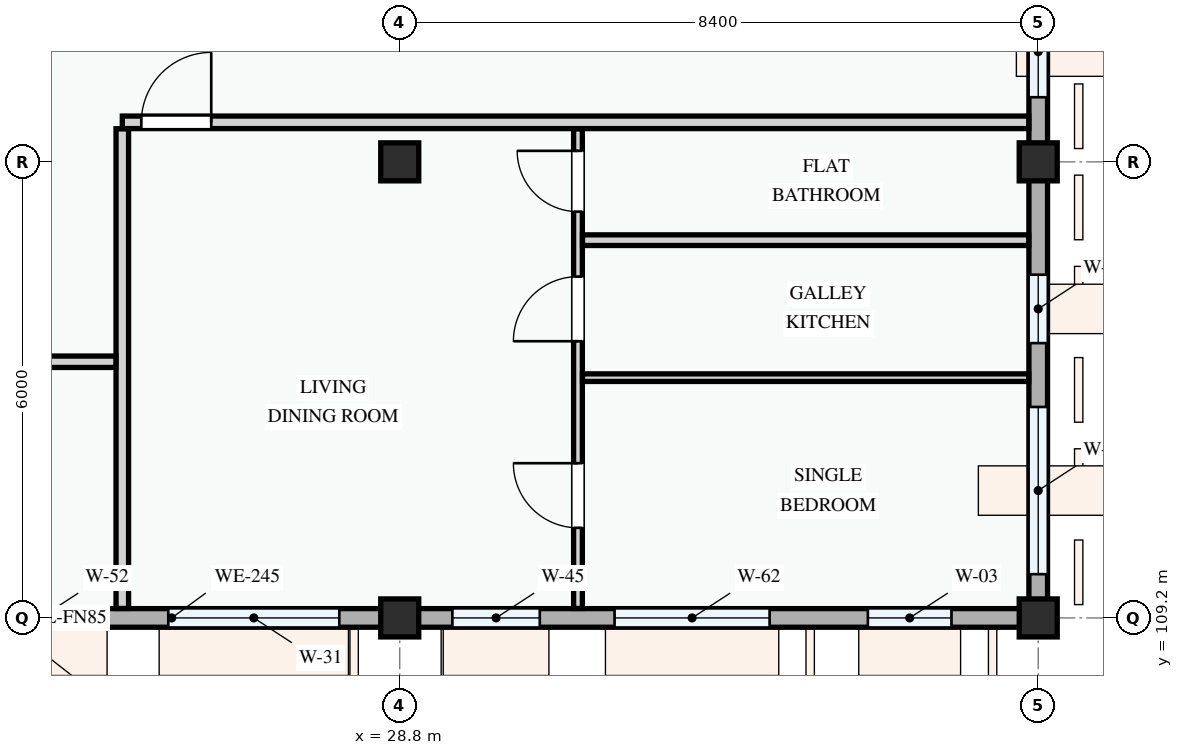
"""IFC4 building model, lengths in metres.
Left out: names, types, materials, properties, quantities, classifications, styles, units other than length and angle.
Written with IfcOpenShell. Run it as: python <this file> out.ifc"""

import sys

from ifc_helpers import new_model, si_unit, direction, frame, frame_2d, origin, origin_2d, place, context, subcontext, project, spatial, rectangle, extrude, element, fill, save


model = new_model("IFC4")
c1 = context("Model", 3, precision=1e-05, world=origin(), true_north=direction((0.0, 1.0)))
c2 = subcontext(c1, "Body", "Model", "MODEL_VIEW")
j1 = project(units=[si_unit("LENGTHUNIT", "METRE"), si_unit("PLANEANGLEUNIT", "RADIAN")], contexts=[c1])
p1 = place(None, origin())
s1 = spatial("IfcSite", under=j1, at=p1, CompositionType="ELEMENT")
p2 = place(p1, origin())
s2 = spatial("IfcBuilding", under=s1, at=p2, CompositionType="ELEMENT")
p3 = place(p2, frame((0.0, 0.0, 41.1)))
s3 = spatial("IfcBuildingStorey", under=s2, at=p3, CompositionType="ELEMENT", Elevation=41.1)
for number, where, z_axis, x_axis in (
    (1, (28.8, 109.2, 0.0), (0.0, 0.0, 1.0), (1.0, 0.0, 0.0)),
    (2, (28.8, 115.2, 0.0), (0.0, 0.0, 1.0), (1.0, 0.0, 0.0)),
    (3, (37.2, 109.2, 0.0), (0.0, 0.0, 1.0), (1.0, 0.0, 0.0)),
    (4, (37.2, 115.2, 0.0), (0.0, 0.0, 1.0), (1.0, 0.0, 0.0)),
):
    element("IfcColumn", number, at=place(p3, frame(where, z_axis=z_axis, x_axis=x_axis)), inside=s3, PredefinedType="COLUMN", context=c2, shape_type="SweptSolid", body=[
        extrude(rectangle(XDim=0.5, YDim=0.5, at=origin_2d()), origin(), (0.0, 0.0, 1.0), 3.3),
    ])
p4 = place(p3, frame((22.8, 109.2, 0.0), z_axis=(0.0, 0.0, 1.0), x_axis=(1.0, 0.0, 0.0)))
e5 = element("IfcWall", 5, at=p4, inside=s3, PredefinedType="STANDARD", context=c2, shape_type="SweptSolid", body=[
    extrude(rectangle(XDim=6.0, YDim=0.245, at=frame_2d((3.0, 0.0))), origin(), (0.0, 0.0, 1.0), 2.525),
])
p5 = place(p4, frame((0.51, 0.0, 0.78)))
e6 = element("IfcOpeningElement", 6, at=p5, cuts=e5, PredefinedType="OPENING", context=c2, shape_type="SweptSolid", body=[
    extrude(rectangle(XDim=1.52, YDim=1.42, at=frame_2d((0.76, 0.71))), frame((0.0, 0.133, 0.0), z_axis=(0.0, -1.0, 0.0), x_axis=(1.0, 0.0, 0.0)), (0.0, 0.0, 1.0), 0.265),
])
p6 = place(p4, frame((2.955, 0.0, 0.78)))
e7 = element("IfcOpeningElement", 7, at=p6, cuts=e5, PredefinedType="OPENING", context=c2, shape_type="SweptSolid", body=[
    extrude(rectangle(XDim=2.25, YDim=1.6, at=frame_2d((1.125, 0.8))), frame((0.0, 0.133, 0.0), z_axis=(0.0, -1.0, 0.0), x_axis=(1.0, 0.0, 0.0)), (0.0, 0.0, 1.0), 0.265),
])
p7 = place(p3, frame((28.8, 109.2, 0.0), z_axis=(0.0, 0.0, 1.0), x_axis=(1.0, 0.0, 0.0)))
e8 = element("IfcWall", 8, at=p7, inside=s3, PredefinedType="STANDARD", context=c2, shape_type="SweptSolid", body=[
    extrude(rectangle(XDim=8.4, YDim=0.245, at=frame_2d((4.2, 0.0))), origin(), (0.0, 0.0, 1.0), 2.375),
])
p8 = place(p7, frame((0.692, 0.0, 0.78)))
e9 = element("IfcOpeningElement", 9, at=p8, cuts=e8, PredefinedType="OPENING", context=c2, shape_type="SweptSolid", body=[
    extrude(rectangle(XDim=1.15, YDim=1.25, at=frame_2d((0.575, 0.625))), frame((0.0, 0.133, 0.0), z_axis=(0.0, -1.0, 0.0), x_axis=(1.0, 0.0, 0.0)), (0.0, 0.0, 1.0), 0.265),
])
p9 = place(p7, frame((2.826, 0.0, 0.78)))
e10 = element("IfcOpeningElement", 10, at=p9, cuts=e8, PredefinedType="OPENING", context=c2, shape_type="SweptSolid", body=[
    extrude(rectangle(XDim=2.04, YDim=1.46, at=frame_2d((1.02, 0.73))), frame((0.0, 0.133, 0.0), z_axis=(0.0, -1.0, 0.0), x_axis=(1.0, 0.0, 0.0)), (0.0, 0.0, 1.0), 0.265),
])
p10 = place(p7, frame((6.159, 0.0, 0.78)))
e11 = element("IfcOpeningElement", 11, at=p10, cuts=e8, PredefinedType="OPENING", context=c2, shape_type="SweptSolid", body=[
    extrude(rectangle(XDim=1.1, YDim=1.3, at=frame_2d((0.55, 0.65))), frame((0.0, 0.133, 0.0), z_axis=(0.0, -1.0, 0.0), x_axis=(1.0, 0.0, 0.0)), (0.0, 0.0, 1.0), 0.265),
])
p11 = place(p3, frame((37.2, 109.2, 0.0), z_axis=(0.0, 0.0, 1.0), x_axis=(0.0, 1.0, 0.0)))
e12 = element("IfcWall", 12, at=p11, inside=s3, PredefinedType="STANDARD", context=c2, shape_type="SweptSolid", body=[
    extrude(rectangle(XDim=6.0, YDim=0.245, at=frame_2d((3.0, 0.0))), origin(), (0.0, 0.0, 1.0), 2.575),
])
p12 = place(p11, frame((0.575, 0.0, 0.78)))
e13 = element("IfcOpeningElement", 13, at=p12, cuts=e12, PredefinedType="OPENING", context=c2, shape_type="SweptSolid", body=[
    extrude(rectangle(XDim=2.2, YDim=1.5, at=frame_2d((1.1, 0.75))), frame((0.0, 0.133, 0.0), z_axis=(0.0, -1.0, 0.0), x_axis=(1.0, 0.0, 0.0)), (0.0, 0.0, 1.0), 0.265),
])
p13 = place(p11, frame((3.615, 0.0, 0.78)))
e14 = element("IfcOpeningElement", 14, at=p13, cuts=e12, PredefinedType="OPENING", context=c2, shape_type="SweptSolid", body=[
    extrude(rectangle(XDim=0.9, YDim=1.2, at=frame_2d((0.45, 0.6))), frame((0.0, 0.133, 0.0), z_axis=(0.0, -1.0, 0.0), x_axis=(1.0, 0.0, 0.0)), (0.0, 0.0, 1.0), 0.265),
])
p14 = place(p3, frame((37.2, 115.2, 0.0), z_axis=(0.0, 0.0, 1.0), x_axis=(0.0, 1.0, 0.0)))
e15 = element("IfcWall", 15, at=p14, inside=s3, PredefinedType="STANDARD", context=c2, shape_type="SweptSolid", body=[
    extrude(rectangle(XDim=8.4, YDim=0.245, at=frame_2d((4.2, 0.0))), origin(), (0.0, 0.0, 1.0), 2.425),
])
p15 = place(p14, frame((0.85, 0.0, 0.78)))
e16 = element("IfcOpeningElement", 16, at=p15, cuts=e15, PredefinedType="OPENING", context=c2, shape_type="SweptSolid", body=[
    extrude(rectangle(XDim=1.2, YDim=1.35, at=frame_2d((0.6, 0.675))), frame((0.0, 0.133, 0.0), z_axis=(0.0, -1.0, 0.0), x_axis=(1.0, 0.0, 0.0)), (0.0, 0.0, 1.0), 0.265),
])
p16 = place(p14, frame((4.195, 0.0, 0.78)))
e17 = element("IfcOpeningElement", 17, at=p16, cuts=e15, PredefinedType="OPENING", context=c2, shape_type="SweptSolid", body=[
    extrude(rectangle(XDim=0.9, YDim=1.2, at=frame_2d((0.45, 0.6))), frame((0.0, 0.133, 0.0), z_axis=(0.0, -1.0, 0.0), x_axis=(1.0, 0.0, 0.0)), (0.0, 0.0, 1.0), 0.265),
])
p17 = place(p14, frame((6.395, 0.0, 0.78)))
e18 = element("IfcOpeningElement", 18, at=p17, cuts=e15, PredefinedType="OPENING", context=c2, shape_type="SweptSolid", body=[
    extrude(rectangle(XDim=0.9, YDim=1.2, at=frame_2d((0.45, 0.6))), frame((0.0, 0.133, 0.0), z_axis=(0.0, -1.0, 0.0), x_axis=(1.0, 0.0, 0.0)), (0.0, 0.0, 1.0), 0.265),
])
p18 = place(p3, frame((25.15, 109.324, 0.0), z_axis=(0.0, 0.0, 1.0), x_axis=(0.0, 1.0, 0.0)))
e19 = element("IfcWall", 19, at=p18, inside=s3, PredefinedType="PARTITIONING", context=c2, shape_type="SweptSolid", body=[
    extrude(rectangle(XDim=6.311, YDim=0.165, at=frame_2d((3.156, 0.0))), origin(), (0.0, 0.0, 1.0), 3.0),
])
p19 = place(p3, frame((22.66, 112.57, 0.0), z_axis=(0.0, 0.0, 1.0), x_axis=(1.0, 0.0, 0.0)))
e20 = element("IfcWall", 20, at=p19, inside=s3, PredefinedType="PARTITIONING", context=c2, shape_type="SweptSolid", body=[
    extrude(rectangle(XDim=2.406, YDim=0.15, at=frame_2d((1.203, 0.0))), origin(), (0.0, 0.0, 1.0), 3.0),
])
p20 = place(p3, frame((31.145, 109.324, 0.0), z_axis=(0.0, 0.0, 1.0), x_axis=(0.0, 1.0, 0.0)))
e21 = element("IfcWall", 21, at=p20, inside=s3, PredefinedType="PARTITIONING", context=c2, shape_type="SweptSolid", body=[
    extrude(rectangle(XDim=6.311, YDim=0.115, at=frame_2d((3.156, 0.0))), origin(), (0.0, 0.0, 1.0), 3.0),
])
p21 = place(p20, frame((1.061, 0.0, 0.0)))
e22 = element("IfcOpeningElement", 22, at=p21, cuts=e21, PredefinedType="OPENING", context=c2, shape_type="SweptSolid", body=[
    extrude(rectangle(XDim=0.85, YDim=2.1, at=frame_2d((0.425, 1.05))), frame((0.0, 0.067, 0.0), z_axis=(0.0, -1.0, 0.0), x_axis=(1.0, 0.0, 0.0)), (0.0, 0.0, 1.0), 0.135),
])
p22 = place(p20, frame((3.516, 0.0, 0.0)))
e23 = element("IfcOpeningElement", 23, at=p22, cuts=e21, PredefinedType="OPENING", context=c2, shape_type="SweptSolid", body=[
    extrude(rectangle(XDim=0.85, YDim=2.1, at=frame_2d((0.425, 1.05))), frame((0.0, 0.067, 0.0), z_axis=(0.0, -1.0, 0.0), x_axis=(1.0, 0.0, 0.0)), (0.0, 0.0, 1.0), 0.135),
])
p23 = place(p20, frame((5.22, 0.0, 0.0)))
e24 = element("IfcOpeningElement", 24, at=p23, cuts=e21, PredefinedType="OPENING", context=c2, shape_type="SweptSolid", body=[
    extrude(rectangle(XDim=0.8, YDim=2.1, at=frame_2d((0.4, 1.05))), frame((0.0, 0.067, 0.0), z_axis=(0.0, -1.0, 0.0), x_axis=(1.0, 0.0, 0.0)), (0.0, 0.0, 1.0), 0.135),
])
p24 = place(p3, frame((31.205, 112.361, 0.0), z_axis=(0.0, 0.0, 1.0), x_axis=(1.0, 0.0, 0.0)))
e25 = element("IfcWall", 25, at=p24, inside=s3, PredefinedType="PARTITIONING", context=c2, shape_type="SweptSolid", body=[
    extrude(rectangle(XDim=5.871, YDim=0.1, at=frame_2d((2.936, 0.0))), origin(), (0.0, 0.0, 1.0), 3.0),
])
p25 = place(p3, frame((31.205, 114.17, 0.0), z_axis=(0.0, 0.0, 1.0), x_axis=(1.0, 0.0, 0.0)))
e26 = element("IfcWall", 26, at=p25, inside=s3, PredefinedType="PARTITIONING", context=c2, shape_type="SweptSolid", body=[
    extrude(rectangle(XDim=5.871, YDim=0.14, at=frame_2d((2.936, 0.0))), origin(), (0.0, 0.0, 1.0), 3.0),
])
p26 = place(p3, frame((25.15, 115.72, 0.0), z_axis=(0.0, 0.0, 1.0), x_axis=(1.0, 0.0, 0.0)))
e27 = element("IfcWall", 27, at=p26, inside=s3, PredefinedType="PARTITIONING", context=c2, shape_type="SweptSolid", body=[
    extrude(rectangle(XDim=11.926, YDim=0.165, at=frame_2d((5.963, 0.0))), origin(), (0.0, 0.0, 1.0), 3.0),
])
p27 = place(p26, frame((0.25, 0.0, 0.0)))
e28 = element("IfcOpeningElement", 28, at=p27, cuts=e27, PredefinedType="OPENING", context=c2, shape_type="SweptSolid", body=[
    extrude(rectangle(XDim=0.92, YDim=2.1, at=frame_2d((0.46, 1.05))), frame((0.0, 0.093, 0.0), z_axis=(0.0, -1.0, 0.0), x_axis=(1.0, 0.0, 0.0)), (0.0, 0.0, 1.0), 0.185),
])
p28 = place(p5, origin())
e29 = element("IfcWindow", 29, at=p28, inside=s3, PartitioningType="SINGLE_PANEL", PredefinedType="WINDOW", context=c2, shape_type="SweptSolid", body=[
    extrude(rectangle(XDim=1.52, YDim=1.42, at=frame_2d((0.76, 0.71))), frame((0.0, 0.03, 0.0), z_axis=(0.0, -1.0, 0.0), x_axis=(1.0, 0.0, 0.0)), (0.0, 0.0, 1.0), 0.06),
])
fill(e6, e29)
p29 = place(p6, origin())
e30 = element("IfcWindow", 30, at=p29, inside=s3, PartitioningType="DOUBLE_PANEL_VERTICAL", PredefinedType="WINDOW", context=c2, shape_type="SweptSolid", body=[
    extrude(rectangle(XDim=2.25, YDim=1.6, at=frame_2d((1.125, 0.8))), frame((0.0, 0.03, 0.0), z_axis=(0.0, -1.0, 0.0), x_axis=(1.0, 0.0, 0.0)), (0.0, 0.0, 1.0), 0.06),
])
fill(e7, e30)
p30 = place(p8, origin())
e31 = element("IfcWindow", 31, at=p30, inside=s3, PartitioningType="SINGLE_PANEL", PredefinedType="WINDOW", context=c2, shape_type="SweptSolid", body=[
    extrude(rectangle(XDim=1.15, YDim=1.25, at=frame_2d((0.575, 0.625))), frame((0.0, 0.03, 0.0), z_axis=(0.0, -1.0, 0.0), x_axis=(1.0, 0.0, 0.0)), (0.0, 0.0, 1.0), 0.06),
])
fill(e9, e31)
p31 = place(p9, origin())
e32 = element("IfcWindow", 32, at=p31, inside=s3, PartitioningType="DOUBLE_PANEL_VERTICAL", PredefinedType="WINDOW", context=c2, shape_type="SweptSolid", body=[
    extrude(rectangle(XDim=2.04, YDim=1.46, at=frame_2d((1.02, 0.73))), frame((0.0, 0.03, 0.0), z_axis=(0.0, -1.0, 0.0), x_axis=(1.0, 0.0, 0.0)), (0.0, 0.0, 1.0), 0.06),
])
fill(e10, e32)
p32 = place(p10, origin())
e33 = element("IfcWindow", 33, at=p32, inside=s3, PartitioningType="SINGLE_PANEL", PredefinedType="WINDOW", context=c2, shape_type="SweptSolid", body=[
    extrude(rectangle(XDim=1.1, YDim=1.3, at=frame_2d((0.55, 0.65))), frame((0.0, 0.03, 0.0), z_axis=(0.0, -1.0, 0.0), x_axis=(1.0, 0.0, 0.0)), (0.0, 0.0, 1.0), 0.06),
])
fill(e11, e33)
p33 = place(p12, origin())
e34 = element("IfcWindow", 34, at=p33, inside=s3, PartitioningType="DOUBLE_PANEL_VERTICAL", PredefinedType="WINDOW", context=c2, shape_type="SweptSolid", body=[
    extrude(rectangle(XDim=2.2, YDim=1.5, at=frame_2d((1.1, 0.75))), frame((0.0, 0.03, 0.0), z_axis=(0.0, -1.0, 0.0), x_axis=(1.0, 0.0, 0.0)), (0.0, 0.0, 1.0), 0.06),
])
fill(e13, e34)
p34 = place(p13, origin())
e35 = element("IfcWindow", 35, at=p34, inside=s3, PartitioningType="SINGLE_PANEL", PredefinedType="WINDOW", context=c2, shape_type="SweptSolid", body=[
    extrude(rectangle(XDim=0.9, YDim=1.2, at=frame_2d((0.45, 0.6))), frame((0.0, 0.03, 0.0), z_axis=(0.0, -1.0, 0.0), x_axis=(1.0, 0.0, 0.0)), (0.0, 0.0, 1.0), 0.06),
])
fill(e14, e35)
p35 = place(p15, origin())
e36 = element("IfcWindow", 36, at=p35, inside=s3, PartitioningType="SINGLE_PANEL", PredefinedType="WINDOW", context=c2, shape_type="SweptSolid", body=[
    extrude(rectangle(XDim=1.2, YDim=1.35, at=frame_2d((0.6, 0.675))), frame((0.0, 0.03, 0.0), z_axis=(0.0, -1.0, 0.0), x_axis=(1.0, 0.0, 0.0)), (0.0, 0.0, 1.0), 0.06),
])
fill(e16, e36)
p36 = place(p21, origin())
e37 = element("IfcDoor", 37, at=p36, inside=s3, OperationType="SINGLE_SWING_RIGHT", PredefinedType="DOOR", context=c2, shape_type="SweptSolid", body=[
    extrude(rectangle(XDim=0.85, YDim=2.1, at=frame_2d((0.425, 1.05))), frame((0.0, 0.025, 0.0), z_axis=(0.0, -1.0, 0.0), x_axis=(1.0, 0.0, 0.0)), (0.0, 0.0, 1.0), 0.05),
])
fill(e22, e37)
p37 = place(p22, origin())
e38 = element("IfcDoor", 38, at=p37, inside=s3, OperationType="SINGLE_SWING_LEFT", PredefinedType="DOOR", context=c2, shape_type="SweptSolid", body=[
    extrude(rectangle(XDim=0.85, YDim=2.1, at=frame_2d((0.425, 1.05))), frame((0.0, 0.025, 0.0), z_axis=(0.0, -1.0, 0.0), x_axis=(1.0, 0.0, 0.0)), (0.0, 0.0, 1.0), 0.05),
])
fill(e23, e38)
p38 = place(p23, origin())
e39 = element("IfcDoor", 39, at=p38, inside=s3, OperationType="SINGLE_SWING_RIGHT", PredefinedType="DOOR", context=c2, shape_type="SweptSolid", body=[
    extrude(rectangle(XDim=0.8, YDim=2.1, at=frame_2d((0.4, 1.05))), frame((0.0, 0.025, 0.0), z_axis=(0.0, -1.0, 0.0), x_axis=(1.0, 0.0, 0.0)), (0.0, 0.0, 1.0), 0.05),
])
fill(e24, e39)
p39 = place(p27, origin())
e40 = element("IfcDoor", 40, at=p39, inside=s3, OperationType="SINGLE_SWING_RIGHT", PredefinedType="DOOR", context=c2, shape_type="SweptSolid", body=[
    extrude(rectangle(XDim=0.92, YDim=2.1, at=frame_2d((0.46, 1.05))), frame((0.0, 0.025, 0.0), z_axis=(0.0, -1.0, 0.0), x_axis=(1.0, 0.0, 0.0)), (0.0, 0.0, 1.0), 0.05),
])
fill(e28, e40)
save(model, sys.argv[1])
